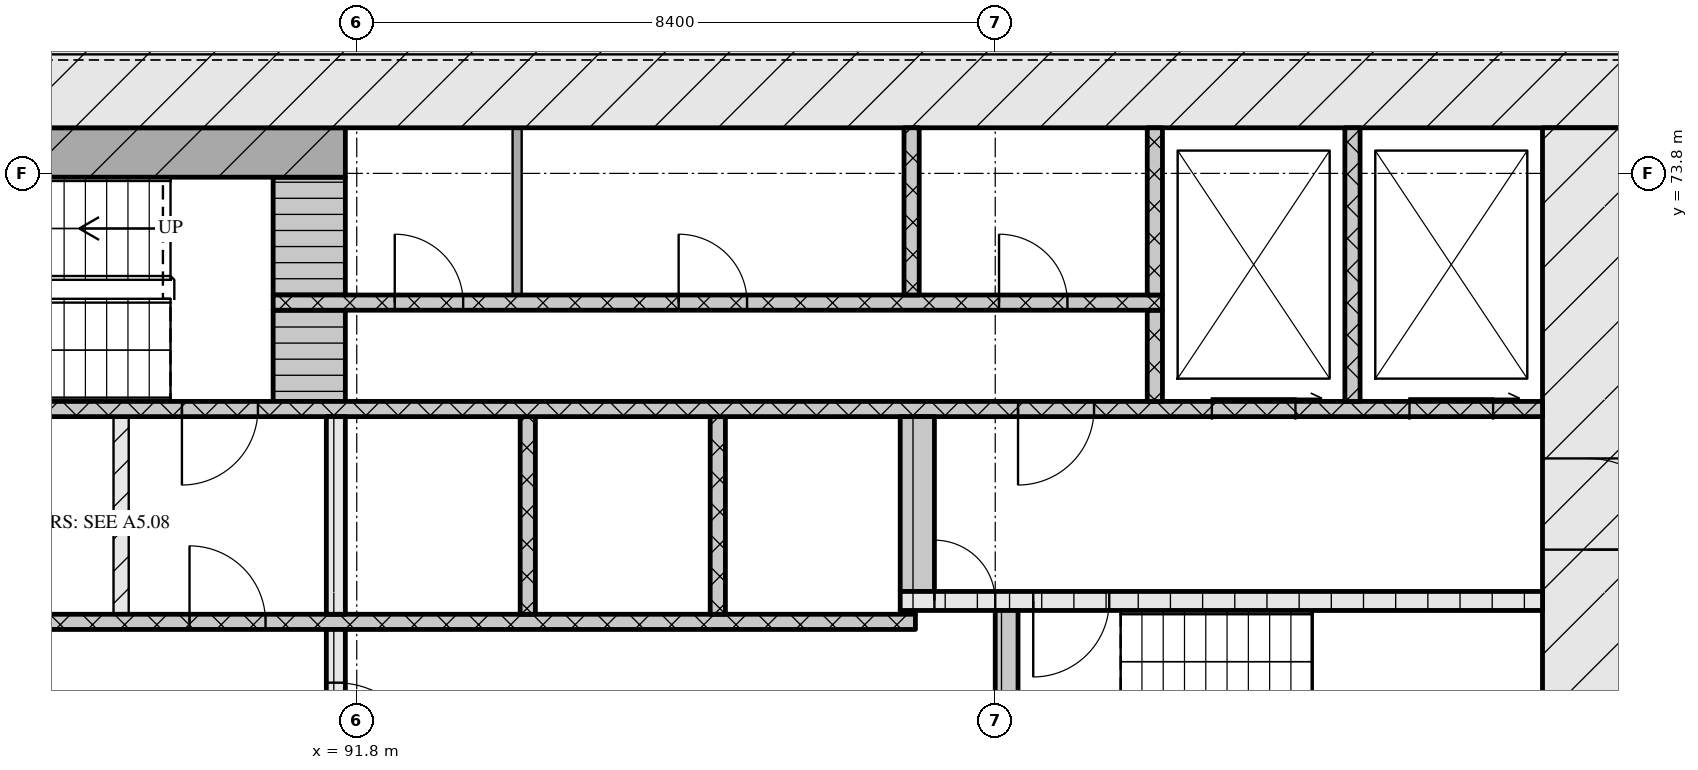
"""IFC4 building model, lengths in metres.
Left out: names, types, materials, properties, quantities, classifications, styles, units other than length and angle.
Written with IfcOpenShell. Run it as: python <this file> out.ifc"""

import sys

from ifc_helpers import new_model, si_unit, direction, frame, frame_2d, origin, place, context, subcontext, project, spatial, rectangle, extrude, element, fill, save


model = new_model("IFC4")
c1 = context("Model", 3, precision=1e-05, world=origin(), true_north=direction((0.0, 1.0)))
c2 = subcontext(c1, "Body", "Model", "MODEL_VIEW")
j1 = project(units=[si_unit("LENGTHUNIT", "METRE"), si_unit("PLANEANGLEUNIT", "RADIAN")], contexts=[c1])
p1 = place(None, origin())
s1 = spatial("IfcSite", under=j1, at=p1, CompositionType="ELEMENT")
p2 = place(p1, origin())
s2 = spatial("IfcBuilding", under=s1, at=p2, CompositionType="ELEMENT")
p3 = place(p2, frame((0.0, 0.0, 48.0)))
s3 = spatial("IfcBuildingStorey", under=s2, at=p3, CompositionType="ELEMENT", Elevation=48.0)
p4 = place(p3, frame((66.6, 75.0, 0.0), z_axis=(0.0, 0.0, 1.0), x_axis=(1.0, 0.0, 0.0)))
e1 = element("IfcWall", 1, at=p4, inside=s3, PredefinedType="SOLIDWALL", context=c2, shape_type="SweptSolid", body=[
    extrude(rectangle(XDim=42.0, YDim=1.2, at=frame_2d((21.0, 0.0))), origin(), (0.0, 0.0, 1.0), 3.32),
])
p5 = place(p3, frame((108.0, 62.4, 0.0), z_axis=(0.0, 0.0, 1.0), x_axis=(0.0, 1.0, 0.0)))
e2 = element("IfcWall", 2, at=p5, inside=s3, PredefinedType="SOLIDWALL", context=c2, shape_type="SweptSolid", body=[
    extrude(rectangle(XDim=12.0, YDim=1.2, at=frame_2d((6.0, 0.0))), origin(), (0.0, 0.0, 1.0), 3.32),
])
p6 = place(p5, frame((6.45, 0.0, 0.0)))
e3 = element("IfcOpeningElement", 3, at=p6, cuts=e2, PredefinedType="OPENING", context=c2, shape_type="SweptSolid", body=[
    extrude(rectangle(XDim=1.2, YDim=2.1, at=frame_2d((0.6, 1.05))), frame((0.0, 0.61, 0.0), z_axis=(0.0, -1.0, 0.0), x_axis=(1.0, 0.0, 0.0)), (0.0, 0.0, 1.0), 1.22),
])
p7 = place(p3, frame((91.525, 65.2, 0.0), z_axis=(0.0, 0.0, 1.0), x_axis=(0.0, 1.0, 0.0)))
e4 = element("IfcWall", 4, at=p7, inside=s3, PredefinedType="SOLIDWALL", context=c2, shape_type="SweptSolid", body=[
    extrude(rectangle(XDim=2.6, YDim=0.25, at=frame_2d((1.3, 0.0))), origin(), (0.0, 0.0, 1.0), 3.32),
])
p8 = place(p7, frame((0.7, 0.0, 0.0)))
e5 = element("IfcOpeningElement", 5, at=p8, cuts=e4, PredefinedType="OPENING", context=c2, shape_type="SweptSolid", body=[
    extrude(rectangle(XDim=1.2, YDim=2.1, at=frame_2d((0.6, 1.05))), frame((0.0, 0.135, 0.0), z_axis=(0.0, -1.0, 0.0), x_axis=(1.0, 0.0, 0.0)), (0.0, 0.0, 1.0), 0.27),
])
p9 = place(p3, frame((100.35, 65.2, 0.0), z_axis=(0.0, 0.0, 1.0), x_axis=(0.0, 1.0, 0.0)))
e6 = element("IfcWall", 6, at=p9, inside=s3, PredefinedType="SOLIDWALL", context=c2, shape_type="SweptSolid", body=[
    extrude(rectangle(XDim=2.85, YDim=0.3, at=frame_2d((1.425, 0.0))), origin(), (0.0, 0.0, 1.0), 3.32),
])
p10 = place(p3, frame((76.05, 67.9, 0.0), z_axis=(0.0, 0.0, 1.0), x_axis=(1.0, 0.0, 0.0)))
e7 = element("IfcWall", 7, at=p10, inside=s3, PredefinedType="SOLIDWALL", context=c2, shape_type="SweptSolid", body=[
    extrude(rectangle(XDim=23.1, YDim=0.2, at=frame_2d((11.55, 0.0))), origin(), (0.0, 0.0, 1.0), 3.32),
])
p11 = place(p10, frame((0.6, 0.0, 0.0)))
e8 = element("IfcOpeningElement", 8, at=p11, cuts=e7, PredefinedType="OPENING", context=c2, shape_type="SweptSolid", body=[
    extrude(rectangle(XDim=1.1, YDim=2.1, at=frame_2d((0.55, 1.05))), frame((0.0, 0.11, 0.0), z_axis=(0.0, -1.0, 0.0), x_axis=(1.0, 0.0, 0.0)), (0.0, 0.0, 1.0), 0.22),
])
p12 = place(p10, frame((3.1, 0.0, 0.0)))
e9 = element("IfcOpeningElement", 9, at=p12, cuts=e7, PredefinedType="OPENING", context=c2, shape_type="SweptSolid", body=[
    extrude(rectangle(XDim=1.1, YDim=2.1, at=frame_2d((0.55, 1.05))), frame((0.0, 0.11, 0.0), z_axis=(0.0, -1.0, 0.0), x_axis=(1.0, 0.0, 0.0)), (0.0, 0.0, 1.0), 0.22),
])
p13 = place(p10, frame((5.6, 0.0, 0.0)))
e10 = element("IfcOpeningElement", 10, at=p13, cuts=e7, PredefinedType="OPENING", context=c2, shape_type="SweptSolid", body=[
    extrude(rectangle(XDim=1.1, YDim=2.1, at=frame_2d((0.55, 1.05))), frame((0.0, 0.11, 0.0), z_axis=(0.0, -1.0, 0.0), x_axis=(1.0, 0.0, 0.0)), (0.0, 0.0, 1.0), 0.22),
])
p14 = place(p10, frame((9.7, 0.0, 0.0)))
e11 = element("IfcOpeningElement", 11, at=p14, cuts=e7, PredefinedType="OPENING", context=c2, shape_type="SweptSolid", body=[
    extrude(rectangle(XDim=0.9, YDim=2.1, at=frame_2d((0.45, 1.05))), frame((0.0, 0.11, 0.0), z_axis=(0.0, -1.0, 0.0), x_axis=(1.0, 0.0, 0.0)), (0.0, 0.0, 1.0), 0.22),
])
p15 = place(p10, frame((13.55, 0.0, 0.0)))
e12 = element("IfcOpeningElement", 12, at=p15, cuts=e7, PredefinedType="OPENING", context=c2, shape_type="SweptSolid", body=[
    extrude(rectangle(XDim=1.0, YDim=2.1, at=frame_2d((0.5, 1.05))), frame((0.0, 0.11, 0.0), z_axis=(0.0, -1.0, 0.0), x_axis=(1.0, 0.0, 0.0)), (0.0, 0.0, 1.0), 0.22),
])
p16 = place(p3, frame((88.7, 68.0, 0.0), z_axis=(0.0, 0.0, 1.0), x_axis=(0.0, 1.0, 0.0)))
e13 = element("IfcWall", 13, at=p16, inside=s3, PredefinedType="PARTITIONING", context=c2, shape_type="SweptSolid", body=[
    extrude(rectangle(XDim=2.6, YDim=0.2, at=frame_2d((1.3, 0.0))), origin(), (0.0, 0.0, 1.0), 3.32),
])
p17 = place(p3, frame((91.525, 68.0, 0.0), z_axis=(0.0, 0.0, 1.0), x_axis=(0.0, 1.0, 0.0)))
e14 = element("IfcWall", 14, at=p17, inside=s3, PredefinedType="SOLIDWALL", context=c2, shape_type="SweptSolid", body=[
    extrude(rectangle(XDim=2.6, YDim=0.25, at=frame_2d((1.3, 0.0))), origin(), (0.0, 0.0, 1.0), 3.32),
])
for number, where, z_axis, x_axis in (
    (15, (94.05, 68.0, 0.0), (0.0, 0.0, 1.0), (0.0, 1.0, 0.0)),
    (16, (96.55, 68.0, 0.0), (0.0, 0.0, 1.0), (0.0, 1.0, 0.0)),
):
    element("IfcWall", number, at=place(p3, frame(where, z_axis=z_axis, x_axis=x_axis)), inside=s3, PredefinedType="SOLIDWALL", context=c2, shape_type="SweptSolid", body=[
        extrude(rectangle(XDim=2.6, YDim=0.2, at=frame_2d((1.3, 0.0))), origin(), (0.0, 0.0, 1.0), 3.32),
    ])
p18 = place(p3, frame((98.95, 68.025, 0.0), z_axis=(0.0, 0.0, 1.0), x_axis=(1.0, 0.0, 0.0)))
e17 = element("IfcWall", 17, at=p18, inside=s3, PredefinedType="SOLIDWALL", context=c2, shape_type="SweptSolid", body=[
    extrude(rectangle(XDim=0.2, YDim=0.05, at=frame_2d((0.1, 0.0))), origin(), (0.0, 0.0, 1.0), 3.32),
])
p19 = place(p3, frame((98.95, 68.175, 0.0), z_axis=(0.0, 0.0, 1.0), x_axis=(1.0, 0.0, 0.0)))
e18 = element("IfcWall", 18, at=p19, inside=s3, PredefinedType="SOLIDWALL", context=c2, shape_type="SweptSolid", body=[
    extrude(rectangle(XDim=8.45, YDim=0.25, at=frame_2d((4.225, 0.0))), origin(), (0.0, 0.0, 1.0), 3.32),
])
p20 = place(p19, frame((0.45, 0.0, 0.0)))
e19 = element("IfcOpeningElement", 19, at=p20, cuts=e18, PredefinedType="OPENING", context=c2, shape_type="SweptSolid", body=[
    extrude(rectangle(XDim=0.8, YDim=2.1, at=frame_2d((0.4, 1.05))), frame((0.0, 0.135, 0.0), z_axis=(0.0, -1.0, 0.0), x_axis=(1.0, 0.0, 0.0)), (0.0, 0.0, 1.0), 0.27),
])
p21 = place(p19, frame((1.75, 0.0, 0.0)))
e20 = element("IfcOpeningElement", 20, at=p21, cuts=e18, PredefinedType="OPENING", context=c2, shape_type="SweptSolid", body=[
    extrude(rectangle(XDim=1.0, YDim=2.1, at=frame_2d((0.5, 1.05))), frame((0.0, 0.135, 0.0), z_axis=(0.0, -1.0, 0.0), x_axis=(1.0, 0.0, 0.0)), (0.0, 0.0, 1.0), 0.27),
])
p22 = place(p3, frame((99.175, 68.3, 0.0), z_axis=(0.0, 0.0, 1.0), x_axis=(0.0, 1.0, 0.0)))
e21 = element("IfcWall", 21, at=p22, inside=s3, PredefinedType="SOLIDWALL", context=c2, shape_type="SweptSolid", body=[
    extrude(rectangle(XDim=2.3, YDim=0.45, at=frame_2d((1.15, 0.0))), origin(), (0.0, 0.0, 1.0), 3.32),
])
p23 = place(p3, frame((67.8, 70.7, 0.0), z_axis=(0.0, 0.0, 1.0), x_axis=(1.0, 0.0, 0.0)))
e22 = element("IfcWall", 22, at=p23, inside=s3, PredefinedType="SOLIDWALL", context=c2, shape_type="SweptSolid", body=[
    extrude(rectangle(XDim=39.6, YDim=0.2, at=frame_2d((19.8, 0.0))), origin(), (0.0, 0.0, 1.0), 3.32),
])
p24 = place(p23, frame((0.65, 0.0, 0.0)))
e23 = element("IfcOpeningElement", 23, at=p24, cuts=e22, PredefinedType="OPENING", context=c2, shape_type="SweptSolid", body=[
    extrude(rectangle(XDim=1.1, YDim=2.1, at=frame_2d((0.55, 1.05))), frame((0.0, 0.11, 0.0), z_axis=(0.0, -1.0, 0.0), x_axis=(1.0, 0.0, 0.0)), (0.0, 0.0, 1.0), 0.22),
])
p25 = place(p23, frame((3.25, 0.0, 0.0)))
e24 = element("IfcOpeningElement", 24, at=p25, cuts=e22, PredefinedType="OPENING", context=c2, shape_type="SweptSolid", body=[
    extrude(rectangle(XDim=1.1, YDim=2.1, at=frame_2d((0.55, 1.05))), frame((0.0, 0.11, 0.0), z_axis=(0.0, -1.0, 0.0), x_axis=(1.0, 0.0, 0.0)), (0.0, 0.0, 1.0), 0.22),
])
p26 = place(p23, frame((5.9, 0.0, 0.0)))
e25 = element("IfcOpeningElement", 25, at=p26, cuts=e22, PredefinedType="OPENING", context=c2, shape_type="SweptSolid", body=[
    extrude(rectangle(XDim=1.0, YDim=2.1, at=frame_2d((0.5, 1.05))), frame((0.0, 0.11, 0.0), z_axis=(0.0, -1.0, 0.0), x_axis=(1.0, 0.0, 0.0)), (0.0, 0.0, 1.0), 0.22),
])
p27 = place(p23, frame((21.7, 0.0, 0.0)))
e26 = element("IfcOpeningElement", 26, at=p27, cuts=e22, PredefinedType="OPENING", context=c2, shape_type="SweptSolid", body=[
    extrude(rectangle(XDim=1.0, YDim=2.1, at=frame_2d((0.5, 1.05))), frame((0.0, 0.11, 0.0), z_axis=(0.0, -1.0, 0.0), x_axis=(1.0, 0.0, 0.0)), (0.0, 0.0, 1.0), 0.22),
])
p28 = place(p23, frame((32.7, 0.0, 0.0)))
e27 = element("IfcOpeningElement", 27, at=p28, cuts=e22, PredefinedType="OPENING", context=c2, shape_type="SweptSolid", body=[
    extrude(rectangle(XDim=1.0, YDim=2.1, at=frame_2d((0.5, 1.05))), frame((0.0, 0.11, 0.0), z_axis=(0.0, -1.0, 0.0), x_axis=(1.0, 0.0, 0.0)), (0.0, 0.0, 1.0), 0.22),
])
p29 = place(p23, frame((35.25, 0.0, 0.0)))
e28 = element("IfcOpeningElement", 28, at=p29, cuts=e22, PredefinedType="OPENING", context=c2, shape_type="SweptSolid", body=[
    extrude(rectangle(XDim=1.1, YDim=2.1, at=frame_2d((0.55, 1.05))), frame((0.0, 0.11, 0.0), z_axis=(0.0, -1.0, 0.0), x_axis=(1.0, 0.0, 0.0)), (0.0, 0.0, 1.0), 0.22),
])
p30 = place(p23, frame((37.85, 0.0, 0.0)))
e29 = element("IfcOpeningElement", 29, at=p30, cuts=e22, PredefinedType="OPENING", context=c2, shape_type="SweptSolid", body=[
    extrude(rectangle(XDim=1.1, YDim=2.1, at=frame_2d((0.55, 1.05))), frame((0.0, 0.11, 0.0), z_axis=(0.0, -1.0, 0.0), x_axis=(1.0, 0.0, 0.0)), (0.0, 0.0, 1.0), 0.22),
])
p31 = place(p3, frame((91.175, 70.8, 0.0), z_axis=(0.0, 0.0, 1.0), x_axis=(0.0, 1.0, 0.0)))
e30 = element("IfcWall", 30, at=p31, inside=s3, PredefinedType="SOLIDWALL", context=c2, shape_type="SweptSolid", body=[
    extrude(rectangle(XDim=1.2, YDim=0.95, at=frame_2d((0.6, 0.0))), origin(), (0.0, 0.0, 1.0), 3.32),
])
p32 = place(p3, frame((102.3, 70.8, 0.0), z_axis=(0.0, 0.0, 1.0), x_axis=(0.0, 1.0, 0.0)))
e31 = element("IfcWall", 31, at=p32, inside=s3, PredefinedType="SOLIDWALL", context=c2, shape_type="SweptSolid", body=[
    extrude(rectangle(XDim=1.2, YDim=0.2, at=frame_2d((0.6, 0.0))), origin(), (0.0, 0.0, 1.0), 3.32),
])
p33 = place(p3, frame((104.9, 70.8, 0.0), z_axis=(0.0, 0.0, 1.0), x_axis=(0.0, 1.0, 0.0)))
e32 = element("IfcWall", 32, at=p33, inside=s3, PredefinedType="SOLIDWALL", context=c2, shape_type="SweptSolid", body=[
    extrude(rectangle(XDim=3.6, YDim=0.2, at=frame_2d((1.8, 0.0))), origin(), (0.0, 0.0, 1.0), 3.32),
])
p34 = place(p3, frame((90.7, 72.1, 0.0), z_axis=(0.0, 0.0, 1.0), x_axis=(1.0, 0.0, 0.0)))
e33 = element("IfcWall", 33, at=p34, inside=s3, PredefinedType="SOLIDWALL", context=c2, shape_type="SweptSolid", body=[
    extrude(rectangle(XDim=11.7, YDim=0.2, at=frame_2d((5.85, 0.0))), origin(), (0.0, 0.0, 1.0), 3.32),
])
p35 = place(p34, frame((1.6, 0.0, 0.0)))
e34 = element("IfcOpeningElement", 34, at=p35, cuts=e33, PredefinedType="OPENING", context=c2, shape_type="SweptSolid", body=[
    extrude(rectangle(XDim=0.9, YDim=2.1, at=frame_2d((0.45, 1.05))), frame((0.0, 0.11, 0.0), z_axis=(0.0, -1.0, 0.0), x_axis=(1.0, 0.0, 0.0)), (0.0, 0.0, 1.0), 0.22),
])
p36 = place(p34, frame((5.335, 0.0, 0.0)))
e35 = element("IfcOpeningElement", 35, at=p36, cuts=e33, PredefinedType="OPENING", context=c2, shape_type="SweptSolid", body=[
    extrude(rectangle(XDim=0.9, YDim=2.1, at=frame_2d((0.45, 1.05))), frame((0.0, 0.11, 0.0), z_axis=(0.0, -1.0, 0.0), x_axis=(1.0, 0.0, 0.0)), (0.0, 0.0, 1.0), 0.22),
])
p37 = place(p34, frame((9.55, 0.0, 0.0)))
e36 = element("IfcOpeningElement", 36, at=p37, cuts=e33, PredefinedType="OPENING", context=c2, shape_type="SweptSolid", body=[
    extrude(rectangle(XDim=0.9, YDim=2.1, at=frame_2d((0.45, 1.05))), frame((0.0, 0.11, 0.0), z_axis=(0.0, -1.0, 0.0), x_axis=(1.0, 0.0, 0.0)), (0.0, 0.0, 1.0), 0.22),
])
p38 = place(p3, frame((91.175, 72.2, 0.0), z_axis=(0.0, 0.0, 1.0), x_axis=(0.0, 1.0, 0.0)))
e37 = element("IfcWall", 37, at=p38, inside=s3, PredefinedType="SOLIDWALL", context=c2, shape_type="SweptSolid", body=[
    extrude(rectangle(XDim=1.55, YDim=0.95, at=frame_2d((0.775, 0.0))), origin(), (0.0, 0.0, 1.0), 3.32),
])
p39 = place(p3, frame((93.91, 72.2, 0.0), z_axis=(0.0, 0.0, 1.0), x_axis=(0.0, 1.0, 0.0)))
e38 = element("IfcWall", 38, at=p39, inside=s3, PredefinedType="PARTITIONING", context=c2, shape_type="SweptSolid", body=[
    extrude(rectangle(XDim=2.2, YDim=0.12, at=frame_2d((1.1, 0.0))), origin(), (0.0, 0.0, 1.0), 3.32),
])
for number, where, z_axis, x_axis in (
    (39, (99.1, 72.2, 0.0), (0.0, 0.0, 1.0), (0.0, 1.0, 0.0)),
    (40, (102.3, 72.2, 0.0), (0.0, 0.0, 1.0), (0.0, 1.0, 0.0)),
):
    element("IfcWall", number, at=place(p3, frame(where, z_axis=z_axis, x_axis=x_axis)), inside=s3, PredefinedType="SOLIDWALL", context=c2, shape_type="SweptSolid", body=[
        extrude(rectangle(XDim=2.2, YDim=0.2, at=frame_2d((1.1, 0.0))), origin(), (0.0, 0.0, 1.0), 3.32),
    ])
p40 = place(p3, frame((83.55, 74.075, 0.0), z_axis=(0.0, 0.0, 1.0), x_axis=(1.0, 0.0, 0.0)))
e41 = element("IfcWall", 41, at=p40, inside=s3, PredefinedType="SOLIDWALL", context=c2, shape_type="SweptSolid", body=[
    extrude(rectangle(XDim=8.1, YDim=0.65, at=frame_2d((4.05, 0.0))), origin(), (0.0, 0.0, 1.0), 3.32),
])
p41 = place(p8, origin())
e42 = element("IfcDoor", 42, at=p41, inside=s3, OperationType="SINGLE_SWING_RIGHT", PredefinedType="DOOR", context=c2, shape_type="SweptSolid", body=[
    extrude(rectangle(XDim=1.2, YDim=2.1, at=frame_2d((0.6, 1.05))), frame((0.0, 0.025, 0.0), z_axis=(0.0, -1.0, 0.0), x_axis=(1.0, 0.0, 0.0)), (0.0, 0.0, 1.0), 0.05),
])
fill(e5, e42)
p42 = place(p15, origin())
e43 = element("IfcDoor", 43, at=p42, inside=s3, OperationType="SINGLE_SWING_LEFT", PredefinedType="DOOR", context=c2, shape_type="SweptSolid", body=[
    extrude(rectangle(XDim=1.0, YDim=2.1, at=frame_2d((0.5, 1.05))), frame((0.0, 0.025, 0.0), z_axis=(0.0, -1.0, 0.0), x_axis=(1.0, 0.0, 0.0)), (0.0, 0.0, 1.0), 0.05),
])
fill(e12, e43)
p43 = place(p20, origin())
e44 = element("IfcDoor", 44, at=p43, inside=s3, OperationType="SINGLE_SWING_LEFT", PredefinedType="DOOR", context=c2, shape_type="SweptSolid", body=[
    extrude(rectangle(XDim=0.8, YDim=2.1, at=frame_2d((0.4, 1.05))), frame((0.0, 0.025, 0.0), z_axis=(0.0, -1.0, 0.0), x_axis=(1.0, 0.0, 0.0)), (0.0, 0.0, 1.0), 0.05),
])
fill(e19, e44)
p44 = place(p21, origin())
e45 = element("IfcDoor", 45, at=p44, inside=s3, OperationType="SINGLE_SWING_RIGHT", PredefinedType="DOOR", context=c2, shape_type="SweptSolid", body=[
    extrude(rectangle(XDim=1.0, YDim=2.1, at=frame_2d((0.5, 1.05))), frame((0.0, 0.025, 0.0), z_axis=(0.0, -1.0, 0.0), x_axis=(1.0, 0.0, 0.0)), (0.0, 0.0, 1.0), 0.05),
])
fill(e20, e45)
p45 = place(p6, origin())
e46 = element("IfcDoor", 46, at=p45, inside=s3, OperationType="SINGLE_SWING_RIGHT", PredefinedType="DOOR", context=c2, shape_type="SweptSolid", body=[
    extrude(rectangle(XDim=1.2, YDim=2.1, at=frame_2d((0.6, 1.05))), frame((0.0, 0.025, 0.0), z_axis=(0.0, -1.0, 0.0), x_axis=(1.0, 0.0, 0.0)), (0.0, 0.0, 1.0), 0.05),
])
fill(e3, e46)
p46 = place(p27, origin())
e47 = element("IfcDoor", 47, at=p46, inside=s3, OperationType="SINGLE_SWING_RIGHT", PredefinedType="DOOR", context=c2, shape_type="SweptSolid", body=[
    extrude(rectangle(XDim=1.0, YDim=2.1, at=frame_2d((0.5, 1.05))), frame((0.0, 0.025, 0.0), z_axis=(0.0, -1.0, 0.0), x_axis=(1.0, 0.0, 0.0)), (0.0, 0.0, 1.0), 0.05),
])
fill(e26, e47)
p47 = place(p28, origin())
e48 = element("IfcDoor", 48, at=p47, inside=s3, OperationType="SINGLE_SWING_RIGHT", PredefinedType="DOOR", context=c2, shape_type="SweptSolid", body=[
    extrude(rectangle(XDim=1.0, YDim=2.1, at=frame_2d((0.5, 1.05))), frame((0.0, 0.025, 0.0), z_axis=(0.0, -1.0, 0.0), x_axis=(1.0, 0.0, 0.0)), (0.0, 0.0, 1.0), 0.05),
])
fill(e27, e48)
p48 = place(p29, origin())
e49 = element("IfcDoor", 49, at=p48, inside=s3, OperationType="SLIDING_TO_RIGHT", PredefinedType="DOOR", context=c2, shape_type="SweptSolid", body=[
    extrude(rectangle(XDim=1.1, YDim=2.1, at=frame_2d((0.55, 1.05))), frame((0.0, 0.025, 0.0), z_axis=(0.0, -1.0, 0.0), x_axis=(1.0, 0.0, 0.0)), (0.0, 0.0, 1.0), 0.05),
])
fill(e28, e49)
p49 = place(p30, origin())
e50 = element("IfcDoor", 50, at=p49, inside=s3, OperationType="SLIDING_TO_RIGHT", PredefinedType="DOOR", context=c2, shape_type="SweptSolid", body=[
    extrude(rectangle(XDim=1.1, YDim=2.1, at=frame_2d((0.55, 1.05))), frame((0.0, 0.025, 0.0), z_axis=(0.0, -1.0, 0.0), x_axis=(1.0, 0.0, 0.0)), (0.0, 0.0, 1.0), 0.05),
])
fill(e29, e50)
p50 = place(p35, origin())
e51 = element("IfcDoor", 51, at=p50, inside=s3, OperationType="SINGLE_SWING_LEFT", PredefinedType="DOOR", context=c2, shape_type="SweptSolid", body=[
    extrude(rectangle(XDim=0.9, YDim=2.1, at=frame_2d((0.45, 1.05))), frame((0.0, 0.025, 0.0), z_axis=(0.0, -1.0, 0.0), x_axis=(1.0, 0.0, 0.0)), (0.0, 0.0, 1.0), 0.05),
])
fill(e34, e51)
p51 = place(p36, origin())
e52 = element("IfcDoor", 52, at=p51, inside=s3, OperationType="SINGLE_SWING_LEFT", PredefinedType="DOOR", context=c2, shape_type="SweptSolid", body=[
    extrude(rectangle(XDim=0.9, YDim=2.1, at=frame_2d((0.45, 1.05))), frame((0.0, 0.025, 0.0), z_axis=(0.0, -1.0, 0.0), x_axis=(1.0, 0.0, 0.0)), (0.0, 0.0, 1.0), 0.05),
])
fill(e35, e52)
p52 = place(p37, origin())
e53 = element("IfcDoor", 53, at=p52, inside=s3, OperationType="SINGLE_SWING_LEFT", PredefinedType="DOOR", context=c2, shape_type="SweptSolid", body=[
    extrude(rectangle(XDim=0.9, YDim=2.1, at=frame_2d((0.45, 1.05))), frame((0.0, 0.025, 0.0), z_axis=(0.0, -1.0, 0.0), x_axis=(1.0, 0.0, 0.0)), (0.0, 0.0, 1.0), 0.05),
])
fill(e36, e53)
save(model, sys.argv[1])
